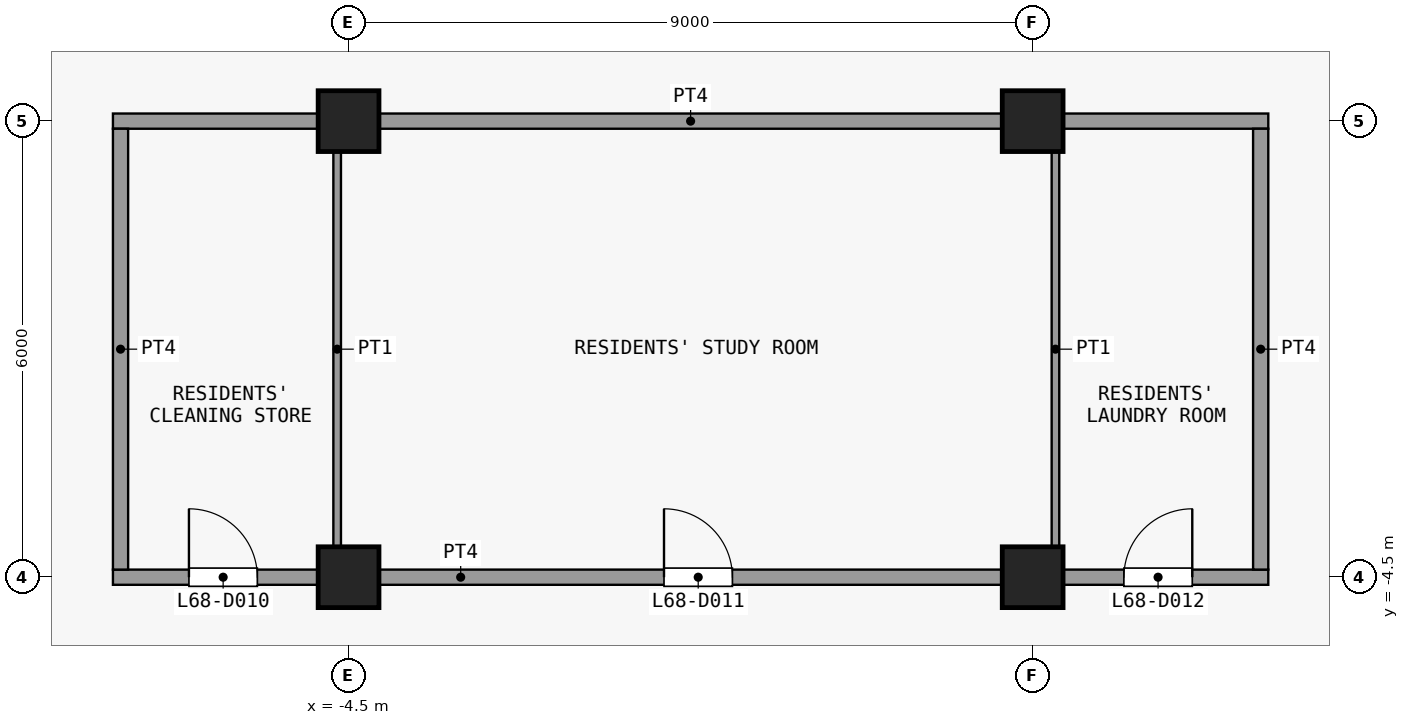
"""IFC4 building model, lengths in metres.
Left out: names, types, materials, properties, quantities, classifications, styles, units other than length and angle.
Written with IfcOpenShell. Run it as: python <this file> out.ifc"""

import sys

from ifc_helpers import new_model, si_unit, direction, frame, frame_2d, origin, origin_2d, place, context, subcontext, project, spatial, rectangle, extrude, element, fill, save


model = new_model("IFC4")
c1 = context("Model", 3, precision=1e-05, world=origin(), true_north=direction((0.0, 1.0)))
c2 = subcontext(c1, "Body", "Model", "MODEL_VIEW")
j1 = project(units=[si_unit("LENGTHUNIT", "METRE"), si_unit("PLANEANGLEUNIT", "RADIAN")], contexts=[c1])
p1 = place(None, origin())
s1 = spatial("IfcSite", under=j1, at=p1, CompositionType="ELEMENT")
p2 = place(p1, origin())
s2 = spatial("IfcBuilding", under=s1, at=p2, CompositionType="ELEMENT")
p3 = place(p2, frame((0.0, 0.0, 269.9)))
s3 = spatial("IfcBuildingStorey", under=s2, at=p3, CompositionType="ELEMENT", Elevation=269.9)
for number, where, z_axis, x_axis in (
    (1, (-4.5, -4.5, 0.0), (0.0, 0.0, 1.0), (1.0, 0.0, 0.0)),
    (2, (-4.5, 1.5, 0.0), (0.0, 0.0, 1.0), (1.0, 0.0, 0.0)),
    (3, (4.5, -4.5, 0.0), (0.0, 0.0, 1.0), (1.0, 0.0, 0.0)),
    (4, (4.5, 1.5, 0.0), (0.0, 0.0, 1.0), (1.0, 0.0, 0.0)),
):
    element("IfcColumn", number, at=place(p3, frame(where, z_axis=z_axis, x_axis=x_axis)), inside=s3, PredefinedType="COLUMN", context=c2, shape_type="SweptSolid", body=[
        extrude(rectangle(XDim=0.8, YDim=0.8, at=origin_2d()), origin(), (0.0, 0.0, 1.0), 3.6),
    ])
p4 = place(p3, frame((-7.6, -4.5, 0.0), z_axis=(0.0, 0.0, 1.0), x_axis=(1.0, 0.0, 0.0)))
e5 = element("IfcWall", 5, at=p4, inside=s3, PredefinedType="PARTITIONING", context=c2, shape_type="SweptSolid", body=[
    extrude(rectangle(XDim=15.2, YDim=0.2, at=frame_2d((7.6, 0.0))), origin(), (0.0, 0.0, 1.0), 3.3),
])
p5 = place(p4, frame((1.0, 0.0, 0.0)))
e6 = element("IfcOpeningElement", 6, at=p5, cuts=e5, PredefinedType="OPENING", context=c2, shape_type="SweptSolid", body=[
    extrude(rectangle(XDim=0.9, YDim=2.1, at=frame_2d((0.45, 1.05))), frame((0.0, 0.11, 0.0), z_axis=(0.0, -1.0, 0.0), x_axis=(1.0, 0.0, 0.0)), (0.0, 0.0, 1.0), 0.22),
])
p6 = place(p4, frame((7.25, 0.0, 0.0)))
e7 = element("IfcOpeningElement", 7, at=p6, cuts=e5, PredefinedType="OPENING", context=c2, shape_type="SweptSolid", body=[
    extrude(rectangle(XDim=0.9, YDim=2.1, at=frame_2d((0.45, 1.05))), frame((0.0, 0.11, 0.0), z_axis=(0.0, -1.0, 0.0), x_axis=(1.0, 0.0, 0.0)), (0.0, 0.0, 1.0), 0.22),
])
p7 = place(p4, frame((13.3, 0.0, 0.0)))
e8 = element("IfcOpeningElement", 8, at=p7, cuts=e5, PredefinedType="OPENING", context=c2, shape_type="SweptSolid", body=[
    extrude(rectangle(XDim=0.9, YDim=2.1, at=frame_2d((0.45, 1.05))), frame((0.0, 0.11, 0.0), z_axis=(0.0, -1.0, 0.0), x_axis=(1.0, 0.0, 0.0)), (0.0, 0.0, 1.0), 0.22),
])
p8 = place(p3, frame((-7.6, 1.5, 0.0), z_axis=(0.0, 0.0, 1.0), x_axis=(1.0, 0.0, 0.0)))
e9 = element("IfcWall", 9, at=p8, inside=s3, PredefinedType="PARTITIONING", context=c2, shape_type="SweptSolid", body=[
    extrude(rectangle(XDim=15.2, YDim=0.2, at=frame_2d((7.6, 0.0))), origin(), (0.0, 0.0, 1.0), 3.3),
])
p9 = place(p3, frame((-7.5, -4.4, 0.0), z_axis=(0.0, 0.0, 1.0), x_axis=(0.0, 1.0, 0.0)))
e10 = element("IfcWall", 10, at=p9, inside=s3, PredefinedType="PARTITIONING", context=c2, shape_type="SweptSolid", body=[
    extrude(rectangle(XDim=5.8, YDim=0.2, at=frame_2d((2.9, 0.0))), origin(), (0.0, 0.0, 1.0), 3.3),
])
for number, where, z_axis, x_axis in (
    (11, (-4.65, -4.4, 0.0), (0.0, 0.0, 1.0), (0.0, 1.0, 0.0)),
    (12, (4.8, -4.4, 0.0), (0.0, 0.0, 1.0), (0.0, 1.0, 0.0)),
):
    element("IfcWall", number, at=place(p3, frame(where, z_axis=z_axis, x_axis=x_axis)), inside=s3, PredefinedType="PARTITIONING", context=c2, shape_type="SweptSolid", body=[
        extrude(rectangle(XDim=5.8, YDim=0.1, at=frame_2d((2.9, 0.0))), origin(), (0.0, 0.0, 1.0), 3.3),
    ])
p10 = place(p3, frame((7.5, -4.4, 0.0), z_axis=(0.0, 0.0, 1.0), x_axis=(0.0, 1.0, 0.0)))
e13 = element("IfcWall", 13, at=p10, inside=s3, PredefinedType="PARTITIONING", context=c2, shape_type="SweptSolid", body=[
    extrude(rectangle(XDim=5.8, YDim=0.2, at=frame_2d((2.9, 0.0))), origin(), (0.0, 0.0, 1.0), 3.3),
])
p11 = place(p5, origin())
e14 = element("IfcDoor", 14, at=p11, inside=s3, OperationType="SINGLE_SWING_RIGHT", PredefinedType="DOOR", context=c2, shape_type="SweptSolid", body=[
    extrude(rectangle(XDim=0.9, YDim=2.1, at=frame_2d((0.45, 1.05))), frame((0.0, 0.025, 0.0), z_axis=(0.0, -1.0, 0.0), x_axis=(1.0, 0.0, 0.0)), (0.0, 0.0, 1.0), 0.05),
])
fill(e6, e14)
p12 = place(p6, origin())
e15 = element("IfcDoor", 15, at=p12, inside=s3, OperationType="SINGLE_SWING_RIGHT", PredefinedType="DOOR", context=c2, shape_type="SweptSolid", body=[
    extrude(rectangle(XDim=0.9, YDim=2.1, at=frame_2d((0.45, 1.05))), frame((0.0, 0.025, 0.0), z_axis=(0.0, -1.0, 0.0), x_axis=(1.0, 0.0, 0.0)), (0.0, 0.0, 1.0), 0.05),
])
fill(e7, e15)
p13 = place(p7, origin())
e16 = element("IfcDoor", 16, at=p13, inside=s3, OperationType="SINGLE_SWING_LEFT", PredefinedType="DOOR", context=c2, shape_type="SweptSolid", body=[
    extrude(rectangle(XDim=0.9, YDim=2.1, at=frame_2d((0.45, 1.05))), frame((0.0, 0.025, 0.0), z_axis=(0.0, -1.0, 0.0), x_axis=(1.0, 0.0, 0.0)), (0.0, 0.0, 1.0), 0.05),
])
fill(e8, e16)
save(model, sys.argv[1])
